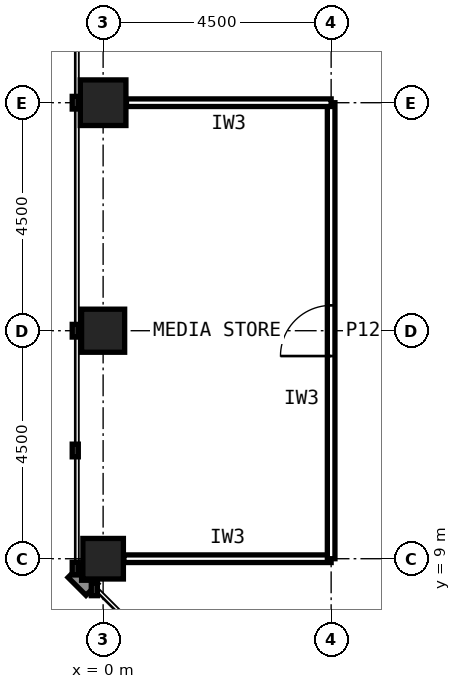
"""IFC4 building model, lengths in metres.
Left out: names, types, materials, properties, quantities, classifications, styles, units other than length and angle.
Written with IfcOpenShell. Run it as: python <this file> out.ifc"""

import sys

from ifc_helpers import new_model, si_unit, direction, frame, frame_2d, origin, origin_2d, place, context, subcontext, project, spatial, rectangle, hollow_rectangle, extrude, element, fill, save


model = new_model("IFC4")
c1 = context("Model", 3, precision=1e-05, world=origin(), true_north=direction((0.0, 1.0)))
c2 = subcontext(c1, "Body", "Model", "MODEL_VIEW")
j1 = project(units=[si_unit("LENGTHUNIT", "METRE"), si_unit("PLANEANGLEUNIT", "RADIAN")], contexts=[c1])
p1 = place(None, origin())
s1 = spatial("IfcSite", under=j1, at=p1, CompositionType="ELEMENT")
p2 = place(p1, origin())
s2 = spatial("IfcBuilding", under=s1, at=p2, CompositionType="ELEMENT")
p3 = place(p2, frame((0.0, 0.0, 54.2)))
s3 = spatial("IfcBuildingStorey", under=s2, at=p3, CompositionType="ELEMENT", Elevation=54.2)
p4 = place(p3, frame((0.0, 18.0, 0.0), z_axis=(0.0, 0.0, 1.0), x_axis=(1.0, 0.0, 0.0)))
e1 = element("IfcColumn", 1, at=p4, inside=s3, PredefinedType="COLUMN", context=c2, shape_type="SweptSolid", body=[
    extrude(hollow_rectangle(XDim=0.9, YDim=0.9, WallThickness=0.063, at=origin_2d()), origin(), (0.0, 0.0, 1.0), 4.2),
])
p5 = place(p3, frame((0.0, 13.5, 0.0), z_axis=(0.0, 0.0, 1.0), x_axis=(1.0, 0.0, 0.0)))
e2 = element("IfcColumn", 2, at=p5, inside=s3, PredefinedType="COLUMN", context=c2, shape_type="SweptSolid", body=[
    extrude(hollow_rectangle(XDim=0.85, YDim=0.85, WallThickness=0.05, at=origin_2d()), origin(), (0.0, 0.0, 1.0), 4.2),
])
p6 = place(p3, frame((0.0, 9.0, 0.0), z_axis=(0.0, 0.0, 1.0), x_axis=(1.0, 0.0, 0.0)))
e3 = element("IfcColumn", 3, at=p6, inside=s3, PredefinedType="COLUMN", context=c2, shape_type="SweptSolid", body=[
    extrude(hollow_rectangle(XDim=0.8, YDim=0.8, WallThickness=0.045, at=origin_2d()), origin(), (0.0, 0.0, 1.0), 4.2),
])
p7 = place(p3, frame((0.41, 9.0, 0.0), z_axis=(0.0, 0.0, 1.0), x_axis=(1.0, 0.0, 0.0)))
e4 = element("IfcWall", 4, at=p7, inside=s3, PredefinedType="PARTITIONING", context=c2, shape_type="SweptSolid", body=[
    extrude(rectangle(XDim=4.09, YDim=0.15, at=frame_2d((2.045, 0.0))), origin(), (0.0, 0.0, 1.0), 3.429),
])
p8 = place(p3, frame((4.5, 9.0, 0.0), z_axis=(0.0, 0.0, 1.0), x_axis=(0.0, 1.0, 0.0)))
e5 = element("IfcWall", 5, at=p8, inside=s3, PredefinedType="PARTITIONING", context=c2, shape_type="SweptSolid", body=[
    extrude(rectangle(XDim=9.0, YDim=0.15, at=frame_2d((4.5, 0.0))), origin(), (0.0, 0.0, 1.0), 4.04),
])
p9 = place(p8, frame((4.0, 0.0, 0.0)))
e6 = element("IfcOpeningElement", 6, at=p9, cuts=e5, PredefinedType="OPENING", context=c2, shape_type="SweptSolid", body=[
    extrude(rectangle(XDim=1.0, YDim=2.1, at=frame_2d((0.5, 1.05))), frame((0.0, 0.085, 0.0), z_axis=(0.0, -1.0, 0.0), x_axis=(1.0, 0.0, 0.0)), (0.0, 0.0, 1.0), 0.17),
])
p10 = place(p3, frame((4.5, 18.0, 0.0), z_axis=(0.0, 0.0, 1.0), x_axis=(-1.0, 0.0, 0.0)))
e7 = element("IfcWall", 7, at=p10, inside=s3, PredefinedType="PARTITIONING", context=c2, shape_type="SweptSolid", body=[
    extrude(rectangle(XDim=4.04, YDim=0.15, at=frame_2d((2.02, 0.0))), origin(), (0.0, 0.0, 1.0), 3.189),
])
p11 = place(p9, origin())
e8 = element("IfcDoor", 8, at=p11, inside=s3, OperationType="SINGLE_SWING_LEFT", PredefinedType="DOOR", context=c2, shape_type="SweptSolid", body=[
    extrude(rectangle(XDim=1.0, YDim=2.1, at=frame_2d((0.5, 1.05))), frame((0.0, 0.025, 0.0), z_axis=(0.0, -1.0, 0.0), x_axis=(1.0, 0.0, 0.0)), (0.0, 0.0, 1.0), 0.05),
])
fill(e6, e8)
save(model, sys.argv[1])
